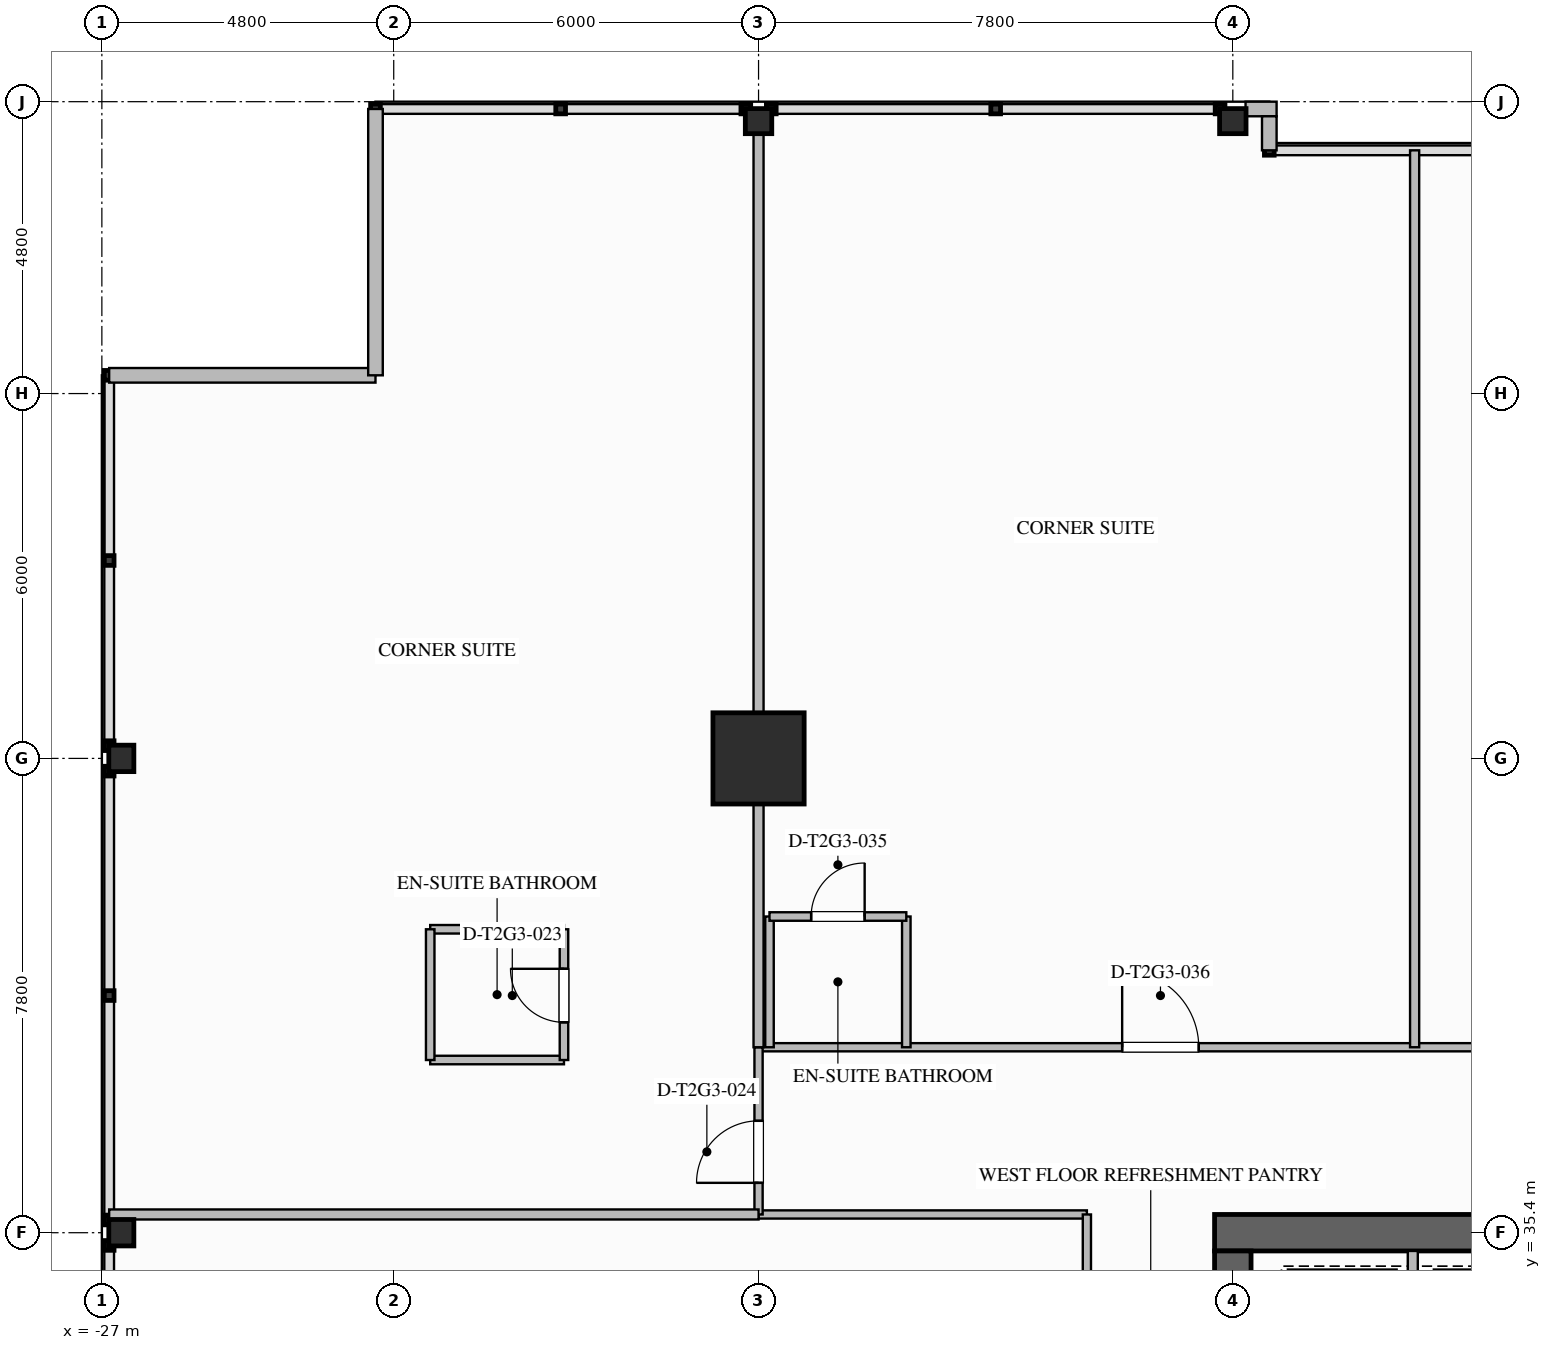
"""IFC4 building model, lengths in metres.
Left out: names, types, materials, properties, quantities, classifications, styles, units other than length and angle.
Written with IfcOpenShell. Run it as: python <this file> out.ifc"""

import sys

from ifc_helpers import new_model, si_unit, direction, frame, frame_2d, origin, origin_2d, place, context, subcontext, project, spatial, rectangle, i_section, extrude, element, fill, save


model = new_model("IFC4")
c1 = context("Model", 3, precision=1e-05, world=origin(), true_north=direction((0.0, 1.0)))
c2 = subcontext(c1, "Body", "Model", "MODEL_VIEW")
j1 = project(units=[si_unit("LENGTHUNIT", "METRE"), si_unit("PLANEANGLEUNIT", "RADIAN")], contexts=[c1])
p1 = place(None, origin())
s1 = spatial("IfcSite", under=j1, at=p1, CompositionType="ELEMENT")
p2 = place(p1, origin())
s2 = spatial("IfcBuilding", under=s1, at=p2, CompositionType="ELEMENT")
p3 = place(p2, frame((0.0, 0.0, 119.8)))
s3 = spatial("IfcBuildingStorey", under=s2, at=p3, CompositionType="ELEMENT", Elevation=119.8)
p4 = place(p3, frame((-8.7, 35.4, 0.0), z_axis=(0.0, 0.0, 1.0), x_axis=(1.0, 0.0, 0.0)))
e1 = element("IfcWall", 1, at=p4, inside=s3, PredefinedType="SHEAR", context=c2, shape_type="SweptSolid", body=[
    extrude(rectangle(XDim=17.4, YDim=0.6, at=frame_2d((8.7, 0.0))), origin(), (0.0, 0.0, 1.0), 3.5),
])
p5 = place(p3, frame((-8.4, 18.9, 0.0), z_axis=(0.0, 0.0, 1.0), x_axis=(0.0, 1.0, 0.0)))
e2 = element("IfcWall", 2, at=p5, inside=s3, PredefinedType="SHEAR", context=c2, shape_type="SweptSolid", body=[
    extrude(rectangle(XDim=16.2, YDim=0.6, at=frame_2d((8.1, 0.0))), origin(), (0.0, 0.0, 1.0), 3.5),
])
p6 = place(p5, frame((4.5, 0.0, 0.0)))
e3 = element("IfcOpeningElement", 3, at=p6, cuts=e2, PredefinedType="OPENING", context=c2, shape_type="SweptSolid", body=[
    extrude(rectangle(XDim=1.08, YDim=2.04, at=frame_2d((0.54, 1.02))), frame((0.0, 0.31, 0.0), z_axis=(0.0, -1.0, 0.0), x_axis=(1.0, 0.0, 0.0)), (0.0, 0.0, 1.0), 0.62),
])
p7 = place(p3, frame((-16.2, 43.2, 0.0), z_axis=(0.0, 0.0, 1.0), x_axis=(1.0, 0.0, 0.0)))
e4 = element("IfcColumn", 4, at=p7, inside=s3, PredefinedType="COLUMN", context=c2, shape_type="SweptSolid", body=[
    extrude(rectangle(XDim=1.5, YDim=1.5, at=origin_2d()), origin(), (0.0, 0.0, 1.0), 3.5),
])
for number, where, z_axis, x_axis in (
    (5, (-26.68, 35.4, 0.0), (0.0, 0.0, 1.0), (1.0, 0.0, 0.0)),
    (6, (-26.68, 43.2, 0.0), (0.0, 0.0, 1.0), (1.0, 0.0, 0.0)),
    (7, (-16.2, 53.68, 0.0), (0.0, 0.0, 1.0), (0.0, 1.0, 0.0)),
    (8, (-8.4, 53.68, 0.0), (0.0, 0.0, 1.0), (0.0, 1.0, 0.0)),
):
    element("IfcColumn", number, at=place(p3, frame(where, z_axis=z_axis, x_axis=x_axis)), inside=s3, PredefinedType="COLUMN", context=c2, shape_type="SweptSolid", body=[
        extrude(i_section(OverallWidth=0.412, OverallDepth=0.435, WebThickness=0.036, FlangeThickness=0.057, FilletRadius=0.028, at=origin_2d()), origin(), (0.0, 0.0, 1.0), 3.497),
    ])
p8 = place(p3, frame((-8.191, 53.88, 0.0), z_axis=(0.0, 0.0, 1.0), x_axis=(1.0, 0.0, 0.0)))
e9 = element("IfcWall", 9, at=p8, inside=s3, PredefinedType="STANDARD", context=c2, shape_type="SweptSolid", body=[
    extrude(rectangle(XDim=0.511, YDim=0.24, at=frame_2d((0.255, 0.0))), origin(), (0.0, 0.0, 1.0), 3.24),
])
for number, where, z_axis, x_axis in (
    (10, (-26.88, 49.5, 0.0), (0.0, 0.0, 1.0), (1.0, 0.0, 0.0)),
    (11, (-22.5, 49.5, 0.0), (0.0, 0.0, 1.0), (0.0, 1.0, 0.0)),
):
    element("IfcWall", number, at=place(p3, frame(where, z_axis=z_axis, x_axis=x_axis)), inside=s3, PredefinedType="STANDARD", context=c2, shape_type="SweptSolid", body=[
        extrude(rectangle(XDim=4.38, YDim=0.24, at=frame_2d((2.19, 0.0))), origin(), (0.0, 0.0, 1.0), 3.24),
    ])
p9 = place(p3, frame((-7.8, 53.76, 0.0), z_axis=(0.0, 0.0, 1.0), x_axis=(0.0, -1.0, 0.0)))
e12 = element("IfcWall", 12, at=p9, inside=s3, PredefinedType="STANDARD", context=c2, shape_type="SweptSolid", body=[
    extrude(rectangle(XDim=0.56, YDim=0.24, at=frame_2d((0.28, 0.0))), origin(), (0.0, 0.0, 1.0), 3.24),
])
p10 = place(p3, frame((-5.44, 32.22, 0.0), z_axis=(0.0, 0.0, 1.0), x_axis=(0.0, 1.0, 0.0)))
e13 = element("IfcWall", 13, at=p10, inside=s3, PredefinedType="PARTITIONING", context=c2, shape_type="SweptSolid", body=[
    extrude(rectangle(XDim=2.88, YDim=0.165, at=frame_2d((1.44, 0.0))), origin(), (0.0, 0.0, 1.0), 3.24),
])
p11 = place(p3, frame((-16.2, 35.7, 0.0), z_axis=(0.0, 0.0, 1.0), x_axis=(1.0, 0.0, 0.0)))
e14 = element("IfcWall", 14, at=p11, inside=s3, PredefinedType="PARTITIONING", context=c2, shape_type="SweptSolid", body=[
    extrude(rectangle(XDim=5.4, YDim=0.135, at=frame_2d((2.7, 0.0))), origin(), (0.0, 0.0, 1.0), 3.24),
])
p12 = place(p3, frame((-16.2, 38.45, 0.0), z_axis=(0.0, 0.0, 1.0), x_axis=(1.0, 0.0, 0.0)))
e15 = element("IfcWall", 15, at=p12, inside=s3, PredefinedType="PARTITIONING", context=c2, shape_type="SweptSolid", body=[
    extrude(rectangle(XDim=24.9, YDim=0.135, at=frame_2d((12.45, 0.0))), origin(), (0.0, 0.0, 1.0), 3.24),
])
p13 = place(p12, frame((5.98, 0.0, 0.0)))
e16 = element("IfcOpeningElement", 16, at=p13, cuts=e15, PredefinedType="OPENING", context=c2, shape_type="SweptSolid", body=[
    extrude(rectangle(XDim=1.26, YDim=2.2, at=frame_2d((0.63, 1.1))), frame((0.0, 0.077, 0.0), z_axis=(0.0, -1.0, 0.0), x_axis=(1.0, 0.0, 0.0)), (0.0, 0.0, 1.0), 0.155),
])
p14 = place(p12, frame((16.0, 0.0, 0.0)))
e17 = element("IfcOpeningElement", 17, at=p14, cuts=e15, PredefinedType="OPENING", context=c2, shape_type="SweptSolid", body=[
    extrude(rectangle(XDim=1.26, YDim=2.2, at=frame_2d((0.63, 1.1))), frame((0.0, 0.077, 0.0), z_axis=(0.0, -1.0, 0.0), x_axis=(1.0, 0.0, 0.0)), (0.0, 0.0, 1.0), 0.155),
])
p15 = place(p3, frame((-10.8, 18.3, 0.0), z_axis=(0.0, 0.0, 1.0), x_axis=(0.0, 1.0, 0.0)))
e18 = element("IfcWall", 18, at=p15, inside=s3, PredefinedType="PARTITIONING", context=c2, shape_type="SweptSolid", body=[
    extrude(rectangle(XDim=17.4, YDim=0.135, at=frame_2d((8.7, 0.0))), origin(), (0.0, 0.0, 1.0), 3.24),
])
p16 = place(p15, frame((6.785, 0.0, 0.0)))
e19 = element("IfcOpeningElement", 19, at=p16, cuts=e18, PredefinedType="OPENING", context=c2, shape_type="SweptSolid", body=[
    extrude(rectangle(XDim=1.26, YDim=2.2, at=frame_2d((0.63, 1.1))), frame((0.0, 0.077, 0.0), z_axis=(0.0, -1.0, 0.0), x_axis=(1.0, 0.0, 0.0)), (0.0, 0.0, 1.0), 0.155),
])
p17 = place(p15, frame((9.355, 0.0, 0.0)))
e20 = element("IfcOpeningElement", 20, at=p17, cuts=e18, PredefinedType="OPENING", context=c2, shape_type="SweptSolid", body=[
    extrude(rectangle(XDim=1.26, YDim=2.2, at=frame_2d((0.63, 1.1))), frame((0.0, 0.077, 0.0), z_axis=(0.0, -1.0, 0.0), x_axis=(1.0, 0.0, 0.0)), (0.0, 0.0, 1.0), 0.155),
])
p18 = place(p3, frame((-16.2, 35.7, 0.0), z_axis=(0.0, 0.0, 1.0), x_axis=(0.0, 1.0, 0.0)))
e21 = element("IfcWall", 21, at=p18, inside=s3, PredefinedType="PARTITIONING", context=c2, shape_type="SweptSolid", body=[
    extrude(rectangle(XDim=2.75, YDim=0.135, at=frame_2d((1.375, 0.0))), origin(), (0.0, 0.0, 1.0), 2.53),
])
p19 = place(p18, frame((0.52, 0.0, 0.0)))
e22 = element("IfcOpeningElement", 22, at=p19, cuts=e21, PredefinedType="OPENING", context=c2, shape_type="SweptSolid", body=[
    extrude(rectangle(XDim=1.02, YDim=2.15, at=frame_2d((0.51, 1.075))), frame((0.0, 0.077, 0.0), z_axis=(0.0, -1.0, 0.0), x_axis=(1.0, 0.0, 0.0)), (0.0, 0.0, 1.0), 0.155),
])
p20 = place(p3, frame((-16.2, 38.45, 0.0), z_axis=(0.0, 0.0, 1.0), x_axis=(0.0, 1.0, 0.0)))
e23 = element("IfcWall", 23, at=p20, inside=s3, PredefinedType="PARTITIONING", context=c2, shape_type="SweptSolid", body=[
    extrude(rectangle(XDim=15.43, YDim=0.165, at=frame_2d((7.715, 0.0))), origin(), (0.0, 0.0, 1.0), 2.53),
])
p21 = place(p3, frame((-26.88, 35.7, 0.0), z_axis=(0.0, 0.0, 1.0), x_axis=(1.0, 0.0, 0.0)))
e24 = element("IfcWall", 24, at=p21, inside=s3, PredefinedType="PARTITIONING", context=c2, shape_type="SweptSolid", body=[
    extrude(rectangle(XDim=10.68, YDim=0.165, at=frame_2d((5.34, 0.0))), origin(), (0.0, 0.0, 1.0), 2.53),
])
for number, where, z_axis, x_axis in (
    (25, (-21.6, 38.24, 0.0), (0.0, 0.0, 1.0), (1.0, 0.0, 0.0)),
    (26, (-21.6, 40.39, 0.0), (0.0, 0.0, 1.0), (1.0, 0.0, 0.0)),
):
    element("IfcWall", number, at=place(p3, frame(where, z_axis=z_axis, x_axis=x_axis)), inside=s3, PredefinedType="PLUMBINGWALL", context=c2, shape_type="SweptSolid", body=[
        extrude(rectangle(XDim=2.2, YDim=0.14, at=frame_2d((1.1, 0.0))), origin(), (0.0, 0.0, 1.0), 3.24),
    ])
p22 = place(p3, frame((-21.6, 38.24, 0.0), z_axis=(0.0, 0.0, 1.0), x_axis=(0.0, 1.0, 0.0)))
e27 = element("IfcWall", 27, at=p22, inside=s3, PredefinedType="PLUMBINGWALL", context=c2, shape_type="SweptSolid", body=[
    extrude(rectangle(XDim=2.15, YDim=0.14, at=frame_2d((1.075, 0.0))), origin(), (0.0, 0.0, 1.0), 3.24),
])
p23 = place(p3, frame((-19.4, 38.24, 0.0), z_axis=(0.0, 0.0, 1.0), x_axis=(0.0, 1.0, 0.0)))
e28 = element("IfcWall", 28, at=p23, inside=s3, PredefinedType="PLUMBINGWALL", context=c2, shape_type="SweptSolid", body=[
    extrude(rectangle(XDim=2.15, YDim=0.14, at=frame_2d((1.075, 0.0))), origin(), (0.0, 0.0, 1.0), 3.24),
])
p24 = place(p23, frame((0.62, 0.0, 0.0)))
e29 = element("IfcOpeningElement", 29, at=p24, cuts=e28, PredefinedType="OPENING", context=c2, shape_type="SweptSolid", body=[
    extrude(rectangle(XDim=0.88, YDim=2.1, at=frame_2d((0.44, 1.05))), frame((0.0, 0.08, 0.0), z_axis=(0.0, -1.0, 0.0), x_axis=(1.0, 0.0, 0.0)), (0.0, 0.0, 1.0), 0.16),
])
p25 = place(p3, frame((-16.02, 38.45, 0.0), z_axis=(0.0, 0.0, 1.0), x_axis=(0.0, 1.0, 0.0)))
e30 = element("IfcWall", 30, at=p25, inside=s3, PredefinedType="PLUMBINGWALL", context=c2, shape_type="SweptSolid", body=[
    extrude(rectangle(XDim=2.15, YDim=0.14, at=frame_2d((1.075, 0.0))), origin(), (0.0, 0.0, 1.0), 2.53),
])
p26 = place(p3, frame((-13.77, 38.45, 0.0), z_axis=(0.0, 0.0, 1.0), x_axis=(0.0, 1.0, 0.0)))
e31 = element("IfcWall", 31, at=p26, inside=s3, PredefinedType="PLUMBINGWALL", context=c2, shape_type="SweptSolid", body=[
    extrude(rectangle(XDim=2.15, YDim=0.14, at=frame_2d((1.075, 0.0))), origin(), (0.0, 0.0, 1.0), 3.24),
])
p27 = place(p3, frame((-16.02, 40.6, 0.0), z_axis=(0.0, 0.0, 1.0), x_axis=(1.0, 0.0, 0.0)))
e32 = element("IfcWall", 32, at=p27, inside=s3, PredefinedType="PLUMBINGWALL", context=c2, shape_type="SweptSolid", body=[
    extrude(rectangle(XDim=2.25, YDim=0.14, at=frame_2d((1.125, 0.0))), origin(), (0.0, 0.0, 1.0), 3.24),
])
p28 = place(p27, frame((0.685, 0.0, 0.0)))
e33 = element("IfcOpeningElement", 33, at=p28, cuts=e32, PredefinedType="OPENING", context=c2, shape_type="SweptSolid", body=[
    extrude(rectangle(XDim=0.88, YDim=2.1, at=frame_2d((0.44, 1.05))), frame((0.0, 0.08, 0.0), z_axis=(0.0, -1.0, 0.0), x_axis=(1.0, 0.0, 0.0)), (0.0, 0.0, 1.0), 0.16),
])
p29 = place(p3, frame((-5.41, 38.45, 0.0), z_axis=(0.0, 0.0, 1.0), x_axis=(0.0, 1.0, 0.0)))
e34 = element("IfcWall", 34, at=p29, inside=s3, PredefinedType="PARTITIONING", context=c2, shape_type="SweptSolid", body=[
    extrude(rectangle(XDim=14.75, YDim=0.15, at=frame_2d((7.375, 0.0))), origin(), (0.0, 0.0, 1.0), 3.24),
])
p30 = place(p24, origin())
e35 = element("IfcDoor", 35, at=p30, inside=s3, OperationType="SINGLE_SWING_RIGHT", PredefinedType="DOOR", context=c2, shape_type="SweptSolid", body=[
    extrude(rectangle(XDim=0.88, YDim=2.1, at=frame_2d((0.44, 1.05))), frame((0.0, 0.025, 0.0), z_axis=(0.0, -1.0, 0.0), x_axis=(1.0, 0.0, 0.0)), (0.0, 0.0, 1.0), 0.05),
])
fill(e29, e35)
p31 = place(p19, origin())
e36 = element("IfcDoor", 36, at=p31, inside=s3, OperationType="SINGLE_SWING_LEFT", PredefinedType="DOOR", context=c2, shape_type="SweptSolid", body=[
    extrude(rectangle(XDim=1.02, YDim=2.15, at=frame_2d((0.51, 1.075))), frame((0.0, 0.025, 0.0), z_axis=(0.0, -1.0, 0.0), x_axis=(1.0, 0.0, 0.0)), (0.0, 0.0, 1.0), 0.05),
])
fill(e22, e36)
p32 = place(p28, origin())
e37 = element("IfcDoor", 37, at=p32, inside=s3, OperationType="SINGLE_SWING_RIGHT", PredefinedType="DOOR", context=c2, shape_type="SweptSolid", body=[
    extrude(rectangle(XDim=0.88, YDim=2.1, at=frame_2d((0.44, 1.05))), frame((0.0, 0.025, 0.0), z_axis=(0.0, -1.0, 0.0), x_axis=(1.0, 0.0, 0.0)), (0.0, 0.0, 1.0), 0.05),
])
fill(e33, e37)
p33 = place(p13, origin())
e38 = element("IfcDoor", 38, at=p33, inside=s3, OperationType="SINGLE_SWING_LEFT", PredefinedType="DOOR", context=c2, shape_type="SweptSolid", body=[
    extrude(rectangle(XDim=1.26, YDim=2.2, at=frame_2d((0.63, 1.1))), frame((0.0, 0.025, 0.0), z_axis=(0.0, -1.0, 0.0), x_axis=(1.0, 0.0, 0.0)), (0.0, 0.0, 1.0), 0.05),
])
fill(e16, e38)
save(model, sys.argv[1])
